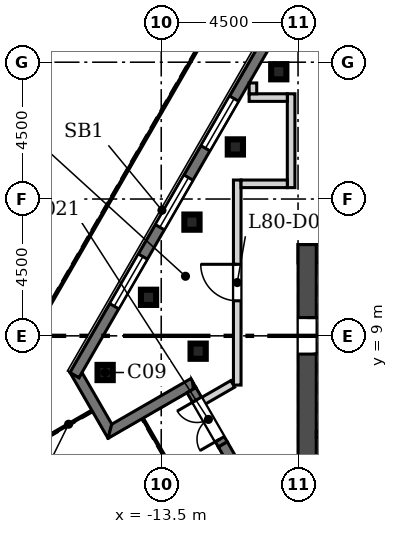
"""IFC4 building model, lengths in metres.
Left out: names, types, materials, properties, quantities, classifications, styles, units other than length and angle.
Written with IfcOpenShell. Run it as: python <this file> out.ifc"""

import sys

from ifc_helpers import new_model, si_unit, direction, frame, frame_2d, origin, origin_2d, place, context, subcontext, project, spatial, polyline, rectangle, hollow_rectangle, outline, extrude, element, fill, save


model = new_model("IFC4")
c1 = context("Model", 3, precision=1e-05, world=origin(), true_north=direction((0.0, 1.0)))
c2 = subcontext(c1, "Body", "Model", "MODEL_VIEW")
j1 = project(units=[si_unit("LENGTHUNIT", "METRE"), si_unit("PLANEANGLEUNIT", "RADIAN")], contexts=[c1])
p1 = place(None, origin())
s1 = spatial("IfcSite", under=j1, at=p1, CompositionType="ELEMENT")
p2 = place(p1, origin())
s2 = spatial("IfcBuilding", under=s1, at=p2, CompositionType="ELEMENT")
p3 = place(p2, frame((0.0, 0.0, 355.1)))
s3 = spatial("IfcBuildingStorey", under=s2, at=p3, CompositionType="ELEMENT", Elevation=355.1)
for number, where, z_axis, x_axis in (
    (1, (-15.345, 7.794, 0.0), (0.0, 0.0, 1.0), (1.0, 0.0, 0.0)),
    (2, (-12.286, 8.495, 0.0), (0.0, 0.0, 1.0), (1.0, 0.0, 0.0)),
    (3, (-9.634, 17.687, 0.0), (0.0, 0.0, 1.0), (1.0, 0.0, 0.0)),
    (4, (-11.062, 15.213, 0.0), (0.0, 0.0, 1.0), (1.0, 0.0, 0.0)),
    (5, (-12.49, 12.74, 0.0), (0.0, 0.0, 1.0), (1.0, 0.0, 0.0)),
    (6, (-13.917, 10.267, 0.0), (0.0, 0.0, 1.0), (1.0, 0.0, 0.0)),
):
    element("IfcColumn", number, at=place(p3, frame(where, z_axis=z_axis, x_axis=x_axis)), inside=s3, PredefinedType="COLUMN", context=c2, shape_type="SweptSolid", body=[
        extrude(hollow_rectangle(XDim=0.5, YDim=0.5, WallThickness=0.025, at=origin_2d()), origin(), (0.0, 0.0, 1.0), 3.9),
    ])
p4 = place(p3, frame((9.0, 11.7, 0.0), z_axis=(0.0, 0.0, 1.0), x_axis=(-1.0, 0.0, 0.0)))
e7 = element("IfcWall", 7, at=p4, inside=s3, PredefinedType="SHEAR", context=c2, shape_type="SweptSolid", body=[
    extrude(rectangle(XDim=18.0, YDim=0.6, at=frame_2d((9.0, 0.0))), origin(), (0.0, 0.0, 1.0), 4.5),
])
p5 = place(p4, frame((8.3, 0.0, 0.0)))
e8 = element("IfcOpeningElement", 8, at=p5, cuts=e7, PredefinedType="OPENING", context=c2, shape_type="SweptSolid", body=[
    extrude(rectangle(XDim=1.4, YDim=2.1, at=frame_2d((0.7, 1.05))), frame((0.0, 0.31, 0.0), z_axis=(0.0, -1.0, 0.0), x_axis=(1.0, 0.0, 0.0)), (0.0, 0.0, 1.0), 0.62),
])
p6 = place(p3, frame((-8.7, 12.0, 0.0), z_axis=(0.0, 0.0, 1.0), x_axis=(0.0, -1.0, 0.0)))
e9 = element("IfcWall", 9, at=p6, inside=s3, PredefinedType="SHEAR", context=c2, shape_type="SweptSolid", body=[
    extrude(rectangle(XDim=11.15, YDim=0.6, at=frame_2d((5.575, 0.0))), origin(), (0.0, 0.0, 1.0), 4.5),
])
p7 = place(p6, frame((2.4, 0.0, 0.0)))
e10 = element("IfcOpeningElement", 10, at=p7, cuts=e9, PredefinedType="OPENING", context=c2, shape_type="SweptSolid", body=[
    extrude(rectangle(XDim=1.2, YDim=2.1, at=frame_2d((0.6, 1.05))), frame((0.0, 0.31, 0.0), z_axis=(0.0, -1.0, 0.0), x_axis=(1.0, 0.0, 0.0)), (0.0, 0.0, 1.0), 0.62),
])
p8 = place(p3, origin())
e11 = element("IfcWall", 11, at=p8, inside=s3, PredefinedType="SOLIDWALL", context=c2, shape_type="SweptSolid", body=[
    extrude(outline(polyline([(-15.25, 5.628), (-16.501, 7.795), (-16.501, 7.795), (-16.206, 7.625), (-16.107, 7.795), (-15.125, 6.094), (-15.25, 5.628), (-15.25, 5.628)])), origin(), (0.0, 0.0, 1.0), 3.9),
])
p9 = place(p3, origin())
e12 = element("IfcWall", 12, at=p9, inside=s3, PredefinedType="SOLIDWALL", context=c2, shape_type="SweptSolid", body=[
    extrude(outline(polyline([(-12.357, 7.299), (-12.444, 7.248), (-12.473, 7.501), (-12.357, 7.299)])), origin(), (0.0, 0.0, 1.0), 3.0),
])
p10 = place(p3, origin())
e13 = element("IfcWall", 13, at=p10, inside=s3, PredefinedType="SOLIDWALL", context=c2, shape_type="SweptSolid", body=[
    extrude(outline(polyline([(-12.473, 7.501), (-12.444, 7.248), (-12.652, 7.129), (-15.25, 5.628), (-15.251, 5.628), (-15.126, 6.094), (-12.527, 7.594), (-12.473, 7.501)])), origin(), (0.0, 0.0, 1.0), 3.9),
])
p11 = place(p3, frame((-12.505, 7.214, 0.0), z_axis=(0.0, 0.0, 1.0), x_axis=(0.500023100387, -0.866012066359, 0.0)))
e14 = element("IfcWall", 14, at=p11, inside=s3, PredefinedType="SOLIDWALL", context=c2, shape_type="SweptSolid", body=[
    extrude(rectangle(XDim=2.062, YDim=0.34, at=frame_2d((1.031, 0.0))), origin(), (0.0, 0.0, 1.0), 3.0),
])
p12 = place(p11, frame((0.362, 0.0, 0.0)))
e15 = element("IfcOpeningElement", 15, at=p12, cuts=e14, PredefinedType="OPENING", context=c2, shape_type="SweptSolid", body=[
    extrude(rectangle(XDim=1.5, YDim=2.4, at=frame_2d((0.75, 1.2))), frame((0.0, 0.18, 0.0), z_axis=(0.0, -1.0, 0.0), x_axis=(1.0, 0.0, 0.0)), (0.0, 0.0, 1.0), 0.36),
])
p13 = place(p3, frame((-11.474, 5.428, 0.0), z_axis=(0.0, 0.0, 1.0), x_axis=(0.499973253207, -0.866040845502, 0.0)))
e16 = element("IfcWall", 16, at=p13, inside=s3, PredefinedType="SOLIDWALL", context=c2, shape_type="SweptSolid", body=[
    extrude(rectangle(XDim=1.938, YDim=0.34, at=frame_2d((0.969, 0.0))), origin(), (0.0, 0.0, 1.0), 3.9),
])
p14 = place(p3, frame((-4.353, 28.494, 0.0), z_axis=(0.0, 0.0, 1.0), x_axis=(-0.49999894854, -0.866026010844, 0.0)))
e17 = element("IfcWall", 17, at=p14, inside=s3, PredefinedType="SOLIDWALL", context=c2, shape_type="SweptSolid", body=[
    extrude(rectangle(XDim=24.0, YDim=0.34, at=frame_2d((12.0, 0.0))), origin(), (0.0, 0.0, 1.0), 3.9),
])
p15 = place(p14, frame((1.5, 0.0, 0.9)))
e18 = element("IfcOpeningElement", 18, at=p15, cuts=e17, PredefinedType="OPENING", context=c2, shape_type="SweptSolid", body=[
    extrude(rectangle(XDim=1.885, YDim=3.0, at=frame_2d((0.942, 1.5))), frame((0.0, 0.18, 0.0), z_axis=(0.0, -1.0, 0.0), x_axis=(1.0, 0.0, 0.0)), (0.0, 0.0, 1.0), 0.36),
])
p16 = place(p14, frame((4.5, 0.0, 0.9)))
e19 = element("IfcOpeningElement", 19, at=p16, cuts=e17, PredefinedType="OPENING", context=c2, shape_type="SweptSolid", body=[
    extrude(rectangle(XDim=1.885, YDim=3.0, at=frame_2d((0.942, 1.5))), frame((0.0, 0.18, 0.0), z_axis=(0.0, -1.0, 0.0), x_axis=(1.0, 0.0, 0.0)), (0.0, 0.0, 1.0), 0.36),
])
p17 = place(p14, frame((13.5, 0.0, 0.9)))
e20 = element("IfcOpeningElement", 20, at=p17, cuts=e17, PredefinedType="OPENING", context=c2, shape_type="SweptSolid", body=[
    extrude(rectangle(XDim=1.885, YDim=3.0, at=frame_2d((0.942, 1.5))), frame((0.0, 0.18, 0.0), z_axis=(0.0, -1.0, 0.0), x_axis=(1.0, 0.0, 0.0)), (0.0, 0.0, 1.0), 0.36),
])
p18 = place(p14, frame((16.5, 0.0, 0.9)))
e21 = element("IfcOpeningElement", 21, at=p18, cuts=e17, PredefinedType="OPENING", context=c2, shape_type="SweptSolid", body=[
    extrude(rectangle(XDim=1.885, YDim=3.0, at=frame_2d((0.942, 1.5))), frame((0.0, 0.18, 0.0), z_axis=(0.0, -1.0, 0.0), x_axis=(1.0, 0.0, 0.0)), (0.0, 0.0, 1.0), 0.36),
])
p19 = place(p14, frame((19.5, 0.0, 0.9)))
e22 = element("IfcOpeningElement", 22, at=p19, cuts=e17, PredefinedType="OPENING", context=c2, shape_type="SweptSolid", body=[
    extrude(rectangle(XDim=1.885, YDim=3.0, at=frame_2d((0.942, 1.5))), frame((0.0, 0.18, 0.0), z_axis=(0.0, -1.0, 0.0), x_axis=(1.0, 0.0, 0.0)), (0.0, 0.0, 1.0), 0.36),
])
p20 = place(p14, frame((9.7, 0.0, 0.0)))
e23 = element("IfcOpeningElement", 23, at=p20, cuts=e17, PredefinedType="OPENING", context=c2, shape_type="SweptSolid", body=[
    extrude(rectangle(XDim=1.885, YDim=2.6, at=frame_2d((0.942, 1.3))), frame((0.0, 0.18, 0.0), z_axis=(0.0, -1.0, 0.0), x_axis=(1.0, 0.0, 0.0)), (0.0, 0.0, 1.0), 0.36),
])
p21 = place(p3, frame((-8.4, 5.75, -0.6), z_axis=(0.0, 0.0, 1.0), x_axis=(1.0, 0.0, 0.0)))
e24 = element("IfcWall", 24, at=p21, inside=s3, PredefinedType="SOLIDWALL", context=c2, shape_type="SweptSolid", body=[
    extrude(rectangle(XDim=16.8, YDim=0.2, at=frame_2d((8.4, 0.0))), origin(), (0.0, 0.0, 1.0), 4.5),
])
p22 = place(p21, frame((7.9, 0.0, 0.6)))
e25 = element("IfcOpeningElement", 25, at=p22, cuts=e24, PredefinedType="OPENING", context=c2, shape_type="SweptSolid", body=[
    extrude(rectangle(XDim=1.0, YDim=2.1, at=frame_2d((0.5, 1.05))), frame((0.0, 0.11, 0.0), z_axis=(0.0, -1.0, 0.0), x_axis=(1.0, 0.0, 0.0)), (0.0, 0.0, 1.0), 0.22),
])
p23 = place(p21, frame((0.15, 0.0, 0.6)))
e26 = element("IfcOpeningElement", 26, at=p23, cuts=e24, PredefinedType="OPENING", context=c2, shape_type="SweptSolid", body=[
    extrude(rectangle(XDim=1.2, YDim=2.1, at=frame_2d((0.6, 1.05))), frame((0.0, 0.11, 0.0), z_axis=(0.0, -1.0, 0.0), x_axis=(1.0, 0.0, 0.0)), (0.0, 0.0, 1.0), 0.22),
])
p24 = place(p21, frame((15.45, 0.0, 0.6)))
e27 = element("IfcOpeningElement", 27, at=p24, cuts=e24, PredefinedType="OPENING", context=c2, shape_type="SweptSolid", body=[
    extrude(rectangle(XDim=1.2, YDim=2.1, at=frame_2d((0.6, 1.05))), frame((0.0, 0.11, 0.0), z_axis=(0.0, -1.0, 0.0), x_axis=(1.0, 0.0, 0.0)), (0.0, 0.0, 1.0), 0.22),
])
p25 = place(p3, frame((-11.0, 7.381, 0.0), z_axis=(0.0, 0.0, 1.0), x_axis=(0.0, 1.0, 0.0)))
e28 = element("IfcWall", 28, at=p25, inside=s3, PredefinedType="SOLIDWALL", context=c2, shape_type="SweptSolid", body=[
    extrude(rectangle(XDim=6.744, YDim=0.25, at=frame_2d((3.372, 0.0))), origin(), (0.0, 0.0, 1.0), 3.9),
])
p26 = place(p25, frame((2.772, 0.0, 0.0)))
e29 = element("IfcOpeningElement", 29, at=p26, cuts=e28, PredefinedType="OPENING", context=c2, shape_type="SweptSolid", body=[
    extrude(rectangle(XDim=1.2, YDim=2.1, at=frame_2d((0.6, 1.05))), frame((0.0, 0.135, 0.0), z_axis=(0.0, -1.0, 0.0), x_axis=(1.0, 0.0, 0.0)), (0.0, 0.0, 1.0), 0.27),
])
p27 = place(p3, frame((-9.228, 13.875, 0.0), z_axis=(0.0, 0.0, 1.0), x_axis=(0.0, 1.0, 0.0)))
e30 = element("IfcWall", 30, at=p27, inside=s3, PredefinedType="SOLIDWALL", context=c2, shape_type="SweptSolid", body=[
    extrude(rectangle(XDim=3.086, YDim=0.25, at=frame_2d((1.543, 0.0))), origin(), (0.0, 0.0, 1.0), 3.9),
])
p28 = place(p3, frame((-10.875, 14.0, 0.0), z_axis=(0.0, 0.0, 1.0), x_axis=(1.0, 0.0, 0.0)))
e31 = element("IfcWall", 31, at=p28, inside=s3, PredefinedType="SOLIDWALL", context=c2, shape_type="SweptSolid", body=[
    extrude(rectangle(XDim=1.522, YDim=0.25, at=frame_2d((0.761, 0.0))), origin(), (0.0, 0.0, 1.0), 3.9),
])
p29 = place(p3, frame((-9.353, 16.836, 0.0), z_axis=(0.0, 0.0, 1.0), x_axis=(-1.0, 0.0, 0.0)))
e32 = element("IfcWall", 32, at=p29, inside=s3, PredefinedType="SOLIDWALL", context=c2, shape_type="SweptSolid", body=[
    extrude(rectangle(XDim=1.256, YDim=0.25, at=frame_2d((0.628, 0.0))), origin(), (0.0, 0.0, 1.0), 3.9),
])
p30 = place(p3, frame((-12.107, 6.866, 0.0), z_axis=(0.0, 0.0, 1.0), x_axis=(0.866024121142, 0.500002221596, 0.0)))
e33 = element("IfcWall", 33, at=p30, inside=s3, PredefinedType="SOLIDWALL", context=c2, shape_type="SweptSolid", body=[
    extrude(rectangle(XDim=1.108, YDim=0.25, at=frame_2d((0.554, 0.0))), origin(), (0.0, 0.0, 1.0), 3.9),
])
p31 = place(p3, frame((-10.484, 16.961, 0.0), z_axis=(0.0, 0.0, 1.0), x_axis=(0.0, 1.0, 0.0)))
e34 = element("IfcWall", 34, at=p31, inside=s3, PredefinedType="SOLIDWALL", context=c2, shape_type="SweptSolid", body=[
    extrude(rectangle(XDim=0.357, YDim=0.25, at=frame_2d((0.178, 0.0))), origin(), (0.0, 0.0, 1.0), 3.9),
])
p32 = place(p12, frame((1.5, 0.0, 0.0), z_axis=(0.0, 0.0, 1.0), x_axis=(-1.0, 0.0, 0.0)))
e35 = element("IfcDoor", 35, at=p32, inside=s3, OperationType="DOUBLE_DOOR_SINGLE_SWING", PredefinedType="DOOR", context=c2, shape_type="SweptSolid", body=[
    extrude(rectangle(XDim=1.5, YDim=2.4, at=frame_2d((0.75, 1.2))), frame((0.0, 0.025, 0.0), z_axis=(0.0, -1.0, 0.0), x_axis=(1.0, 0.0, 0.0)), (0.0, 0.0, 1.0), 0.05),
])
fill(e15, e35)
p33 = place(p17, origin())
e36 = element("IfcWindow", 36, at=p33, inside=s3, PartitioningType="SINGLE_PANEL", PredefinedType="WINDOW", context=c2, shape_type="SweptSolid", body=[
    extrude(rectangle(XDim=1.885, YDim=3.0, at=frame_2d((0.942, 1.5))), frame((0.0, 0.11, 0.0), z_axis=(0.0, -1.0, 0.0), x_axis=(1.0, 0.0, 0.0)), (0.0, 0.0, 1.0), 0.06),
])
fill(e20, e36)
p34 = place(p18, origin())
e37 = element("IfcWindow", 37, at=p34, inside=s3, PartitioningType="SINGLE_PANEL", PredefinedType="WINDOW", context=c2, shape_type="SweptSolid", body=[
    extrude(rectangle(XDim=1.885, YDim=3.0, at=frame_2d((0.942, 1.5))), frame((0.0, 0.11, 0.0), z_axis=(0.0, -1.0, 0.0), x_axis=(1.0, 0.0, 0.0)), (0.0, 0.0, 1.0), 0.06),
])
fill(e21, e37)
p35 = place(p19, origin())
e38 = element("IfcWindow", 38, at=p35, inside=s3, PartitioningType="SINGLE_PANEL", PredefinedType="WINDOW", context=c2, shape_type="SweptSolid", body=[
    extrude(rectangle(XDim=1.885, YDim=3.0, at=frame_2d((0.942, 1.5))), frame((0.0, 0.11, 0.0), z_axis=(0.0, -1.0, 0.0), x_axis=(1.0, 0.0, 0.0)), (0.0, 0.0, 1.0), 0.06),
])
fill(e22, e38)
p36 = place(p7, origin())
e39 = element("IfcDoor", 39, at=p36, inside=s3, OperationType="SINGLE_SWING_LEFT", PredefinedType="DOOR", context=c2, shape_type="SweptSolid", body=[
    extrude(rectangle(XDim=1.2, YDim=2.1, at=frame_2d((0.6, 1.05))), frame((0.0, 0.025, 0.0), z_axis=(0.0, -1.0, 0.0), x_axis=(1.0, 0.0, 0.0)), (0.0, 0.0, 1.0), 0.05),
])
fill(e10, e39)
p37 = place(p26, origin())
e40 = element("IfcDoor", 40, at=p37, inside=s3, OperationType="SINGLE_SWING_RIGHT", PredefinedType="DOOR", context=c2, shape_type="SweptSolid", body=[
    extrude(rectangle(XDim=1.2, YDim=2.1, at=frame_2d((0.6, 1.05))), frame((0.0, 0.025, 0.0), z_axis=(0.0, -1.0, 0.0), x_axis=(1.0, 0.0, 0.0)), (0.0, 0.0, 1.0), 0.05),
])
fill(e29, e40)
save(model, sys.argv[1])
